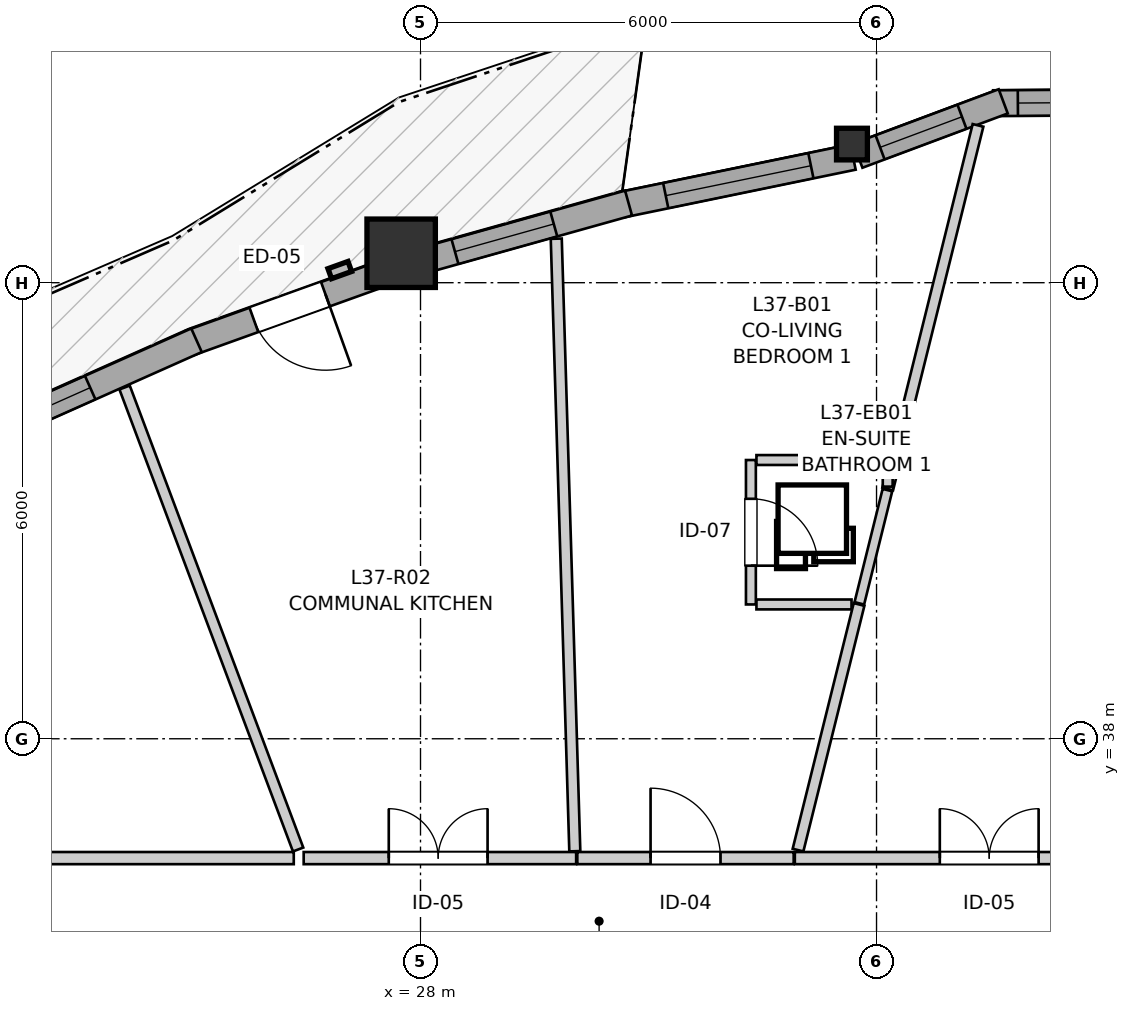
"""IFC4 building model, lengths in metres.
Left out: names, types, materials, properties, quantities, classifications, styles, units other than length and angle.
Written with IfcOpenShell. Run it as: python <this file> out.ifc"""

import sys

from ifc_helpers import new_model, si_unit, direction, frame, frame_2d, origin, origin_2d, place, context, subcontext, project, spatial, rectangle, i_section, extrude, source, transform, mapped, element, fill, save


model = new_model("IFC4")
c1 = context("Model", 3, precision=1e-05, world=origin(), true_north=direction((0.0, 1.0)))
c2 = subcontext(c1, "Body", "Model", "MODEL_VIEW")
j1 = project(units=[si_unit("LENGTHUNIT", "METRE"), si_unit("PLANEANGLEUNIT", "RADIAN")], contexts=[c1])
p1 = place(None, origin())
s1 = spatial("IfcSite", under=j1, at=p1, CompositionType="ELEMENT")
p2 = place(p1, origin())
s2 = spatial("IfcBuilding", under=s1, at=p2, CompositionType="ELEMENT")
p3 = place(p2, frame((0.0, 0.0, 124.8)))
s3 = spatial("IfcBuildingStorey", under=s2, at=p3, CompositionType="ELEMENT", Elevation=124.8)
m1 = source(origin(), c2, "Body", "SweptSolid", [
    extrude(i_section(OverallWidth=0.406, OverallDepth=0.416, WebThickness=0.027, FlangeThickness=0.044, FilletRadius=0.015, at=origin_2d()), origin(), (0.0, 0.0, 1.0), 2.9),
])
p4 = place(p3, frame((33.677, 45.824, 0.0), z_axis=(0.0, 0.0, 1.0), x_axis=(1.0, 0.0, 0.0)))
e1 = element("IfcColumn", 1, at=p4, inside=s3, PredefinedType="PILASTER", context=c2, shape_type="MappedRepresentation", body=[
    mapped(m1, transform((0.0, 0.0, 0.0), x_axis=(1.0, 0.0, 0.0), y_axis=(0.0, 1.0, 0.0), z_axis=(0.0, 0.0, 1.0), scale=1.0)),
])
m2 = source(origin(), c2, "Body", "SweptSolid", [
    extrude(rectangle(XDim=0.9, YDim=0.9, at=origin_2d()), origin(), (0.0, 0.0, 1.0), 2.9),
])
p5 = place(p3, frame((27.746, 44.387, 0.0), z_axis=(0.0, 0.0, 1.0), x_axis=(1.0, 0.0, 0.0)))
e2 = element("IfcColumn", 2, at=p5, inside=s3, PredefinedType="COLUMN", context=c2, shape_type="MappedRepresentation", body=[
    mapped(m2, transform((0.0, 0.0, 0.0), x_axis=(1.0, 0.0, 0.0), y_axis=(0.0, 1.0, 0.0), z_axis=(0.0, 0.0, 1.0), scale=1.0)),
])
p6 = place(p3, frame((37.634, 46.376, 0.0), z_axis=(0.0, 0.0, 1.0), x_axis=(-0.999976456891, -0.00686189939, 0.0)))
e3 = element("IfcWall", 3, at=p6, inside=s3, PredefinedType="SOLIDWALL", context=c2, shape_type="SweptSolid", body=[
    extrude(rectangle(XDim=2.099, YDim=0.34, at=frame_2d((1.05, 0.0))), origin(), (0.0, 0.0, 1.0), 2.43),
])
p7 = place(p6, frame((0.324, 0.0, 0.82)))
e4 = element("IfcOpeningElement", 4, at=p7, cuts=e3, PredefinedType="OPENING", context=c2, shape_type="SweptSolid", body=[
    extrude(rectangle(XDim=1.45, YDim=1.25, at=frame_2d((0.725, 0.625))), frame((0.0, 0.18, 0.0), z_axis=(0.0, -1.0, 0.0), x_axis=(1.0, 0.0, 0.0)), (0.0, 0.0, 1.0), 0.36),
])
p8 = place(p3, frame((35.667, 46.386, 0.0), z_axis=(0.0, 0.0, 1.0), x_axis=(-0.936761017964, -0.34996970615, 0.0)))
e5 = element("IfcWall", 5, at=p8, inside=s3, PredefinedType="SOLIDWALL", context=c2, shape_type="SweptSolid", body=[
    extrude(rectangle(XDim=2.041, YDim=0.34, at=frame_2d((1.021, 0.0))), origin(), (0.0, 0.0, 1.0), 2.43),
])
p9 = place(p8, frame((0.579, 0.0, 0.82)))
e6 = element("IfcOpeningElement", 6, at=p9, cuts=e5, PredefinedType="OPENING", context=c2, shape_type="SweptSolid", body=[
    extrude(rectangle(XDim=1.15, YDim=1.2, at=frame_2d((0.575, 0.6))), frame((0.0, 0.18, 0.0), z_axis=(0.0, -1.0, 0.0), x_axis=(1.0, 0.0, 0.0)), (0.0, 0.0, 1.0), 0.36),
])
p10 = place(p3, frame((33.691, 45.653, 0.0), z_axis=(0.0, 0.0, 1.0), x_axis=(-0.979414063846, -0.201861565287, 0.0)))
e7 = element("IfcWall", 7, at=p10, inside=s3, PredefinedType="SOLIDWALL", context=c2, shape_type="SweptSolid", body=[
    extrude(rectangle(XDim=3.104, YDim=0.34, at=frame_2d((1.552, 0.0))), origin(), (0.0, 0.0, 1.0), 2.43),
])
p11 = place(p10, frame((0.567, 0.0, 0.82)))
e8 = element("IfcOpeningElement", 8, at=p11, cuts=e7, PredefinedType="OPENING", context=c2, shape_type="SweptSolid", body=[
    extrude(rectangle(XDim=1.95, YDim=1.4, at=frame_2d((0.975, 0.7))), frame((0.0, 0.18, 0.0), z_axis=(0.0, -1.0, 0.0), x_axis=(1.0, 0.0, 0.0)), (0.0, 0.0, 1.0), 0.36),
])
p12 = place(p3, frame((30.737, 45.048, 0.0), z_axis=(0.0, 0.0, 1.0), x_axis=(-0.963026728711, -0.26940586443, 0.0)))
e9 = element("IfcWall", 9, at=p12, inside=s3, PredefinedType="SOLIDWALL", context=c2, shape_type="SweptSolid", body=[
    extrude(rectangle(XDim=2.829, YDim=0.34, at=frame_2d((1.415, 0.0))), origin(), (0.0, 0.0, 1.0), 2.43),
])
p13 = place(p12, frame((1.021, 0.0, 0.82)))
e10 = element("IfcOpeningElement", 10, at=p13, cuts=e9, PredefinedType="OPENING", context=c2, shape_type="SweptSolid", body=[
    extrude(rectangle(XDim=1.35, YDim=1.45, at=frame_2d((0.675, 0.725))), frame((0.0, 0.18, 0.0), z_axis=(0.0, -1.0, 0.0), x_axis=(1.0, 0.0, 0.0)), (0.0, 0.0, 1.0), 0.36),
])
p14 = place(p3, frame((27.586, 44.149, 0.0), z_axis=(0.0, 0.0, 1.0), x_axis=(-0.941112277287, -0.338094190338, 0.0)))
e11 = element("IfcWall", 11, at=p14, inside=s3, PredefinedType="SOLIDWALL", context=c2, shape_type="SweptSolid", body=[
    extrude(rectangle(XDim=2.779, YDim=0.34, at=frame_2d((1.39, 0.0))), origin(), (0.0, 0.0, 1.0), 2.43),
])
p15 = place(p14, frame((0.89, 0.0, 0.0)))
e12 = element("IfcOpeningElement", 12, at=p15, cuts=e11, PredefinedType="OPENING", context=c2, shape_type="SweptSolid", body=[
    extrude(rectangle(XDim=1.0, YDim=2.1, at=frame_2d((0.5, 1.05))), frame((0.0, 0.18, 0.0), z_axis=(0.0, -1.0, 0.0), x_axis=(1.0, 0.0, 0.0)), (0.0, 0.0, 1.0), 0.36),
])
p16 = place(p3, frame((25.053, 43.243, 0.0), z_axis=(0.0, 0.0, 1.0), x_axis=(-0.91339900063, -0.407065431655, 0.0)))
e13 = element("IfcWall", 13, at=p16, inside=s3, PredefinedType="SOLIDWALL", context=c2, shape_type="SweptSolid", body=[
    extrude(rectangle(XDim=2.956, YDim=0.34, at=frame_2d((1.478, 0.0))), origin(), (0.0, 0.0, 1.0), 2.43),
])
p17 = place(p16, frame((1.531, 0.0, 0.82)))
e14 = element("IfcOpeningElement", 14, at=p17, cuts=e13, PredefinedType="OPENING", context=c2, shape_type="SweptSolid", body=[
    extrude(rectangle(XDim=0.95, YDim=1.35, at=frame_2d((0.475, 0.675))), frame((0.0, 0.18, 0.0), z_axis=(0.0, -1.0, 0.0), x_axis=(1.0, 0.0, 0.0)), (0.0, 0.0, 1.0), 0.36),
])
p18 = place(p3, frame((32.925, 36.43, 0.0), z_axis=(0.0, 0.0, 1.0), x_axis=(1.0, 0.0, 0.0)))
e15 = element("IfcWall", 15, at=p18, inside=s3, PredefinedType="PARTITIONING", context=c2, shape_type="SweptSolid", body=[
    extrude(rectangle(XDim=5.118, YDim=0.16, at=frame_2d((2.559, 0.0))), origin(), (0.0, 0.0, 1.0), 2.538),
])
p19 = place(p18, frame((1.907, 0.0, 0.0)))
e16 = element("IfcOpeningElement", 16, at=p19, cuts=e15, PredefinedType="OPENING", context=c2, shape_type="SweptSolid", body=[
    extrude(rectangle(XDim=1.3, YDim=2.1, at=frame_2d((0.65, 1.05))), frame((0.0, 0.09, 0.0), z_axis=(0.0, -1.0, 0.0), x_axis=(1.0, 0.0, 0.0)), (0.0, 0.0, 1.0), 0.18),
])
p20 = place(p3, frame((26.463, 36.43, 0.0), z_axis=(0.0, 0.0, 1.0), x_axis=(1.0, 0.0, 0.0)))
e17 = element("IfcWall", 17, at=p20, inside=s3, PredefinedType="PARTITIONING", context=c2, shape_type="SweptSolid", body=[
    extrude(rectangle(XDim=3.585, YDim=0.16, at=frame_2d((1.792, 0.0))), origin(), (0.0, 0.0, 1.0), 2.9),
])
p21 = place(p20, frame((1.119, 0.0, 0.0)))
e18 = element("IfcOpeningElement", 18, at=p21, cuts=e17, PredefinedType="OPENING", context=c2, shape_type="SweptSolid", body=[
    extrude(rectangle(XDim=1.3, YDim=2.1, at=frame_2d((0.65, 1.05))), frame((0.0, 0.09, 0.0), z_axis=(0.0, -1.0, 0.0), x_axis=(1.0, 0.0, 0.0)), (0.0, 0.0, 1.0), 0.18),
])
p22 = place(p3, frame((30.063, 36.43, 0.0), z_axis=(0.0, 0.0, 1.0), x_axis=(1.0, 0.0, 0.0)))
e19 = element("IfcWall", 19, at=p22, inside=s3, PredefinedType="PARTITIONING", context=c2, shape_type="SweptSolid", body=[
    extrude(rectangle(XDim=2.847, YDim=0.16, at=frame_2d((1.423, 0.0))), origin(), (0.0, 0.0, 1.0), 2.9),
])
p23 = place(p22, frame((0.964, 0.0, 0.0)))
e20 = element("IfcOpeningElement", 20, at=p23, cuts=e19, PredefinedType="OPENING", context=c2, shape_type="SweptSolid", body=[
    extrude(rectangle(XDim=0.92, YDim=2.1, at=frame_2d((0.46, 1.05))), frame((0.0, 0.09, 0.0), z_axis=(0.0, -1.0, 0.0), x_axis=(1.0, 0.0, 0.0)), (0.0, 0.0, 1.0), 0.18),
])
p24 = place(p3, frame((32.347, 41.667, 0.0), z_axis=(0.0, 0.0, 1.0), x_axis=(0.0, -1.0, 0.0)))
e21 = element("IfcWall", 21, at=p24, inside=s3, PredefinedType="PARTITIONING", context=c2, shape_type="SweptSolid", body=[
    extrude(rectangle(XDim=1.9, YDim=0.13, at=frame_2d((0.95, 0.0))), origin(), (0.0, 0.0, 1.0), 2.9),
])
p25 = place(p24, frame((0.51, 0.0, 0.0)))
e22 = element("IfcOpeningElement", 22, at=p25, cuts=e21, PredefinedType="OPENING", context=c2, shape_type="SweptSolid", body=[
    extrude(rectangle(XDim=0.88, YDim=2.05, at=frame_2d((0.44, 1.025))), frame((0.0, 0.075, 0.0), z_axis=(0.0, -1.0, 0.0), x_axis=(1.0, 0.0, 0.0)), (0.0, 0.0, 1.0), 0.15),
])
p26 = place(p3, frame((29.786, 44.579, 0.0), z_axis=(0.0, 0.0, 1.0), x_axis=(0.030281792334, -0.99954140137, 0.0)))
e23 = element("IfcWall", 23, at=p26, inside=s3, PredefinedType="PARTITIONING", context=c2, shape_type="SweptSolid", body=[
    extrude(rectangle(XDim=8.062, YDim=0.145, at=frame_2d((4.031, 0.0))), origin(), (0.0, 0.0, 1.0), 2.9),
])
p27 = place(p3, frame((24.107, 42.621, 0.0), z_axis=(0.0, 0.0, 1.0), x_axis=(0.351605509999, -0.93614826034, 0.0)))
e24 = element("IfcWall", 24, at=p27, inside=s3, PredefinedType="PARTITIONING", context=c2, shape_type="SweptSolid", body=[
    extrude(rectangle(XDim=6.493, YDim=0.145, at=frame_2d((3.247, 0.0))), origin(), (0.0, 0.0, 1.0), 2.9),
])
p28 = place(p3, frame((34.147, 41.286, 0.0), z_axis=(0.0, 0.0, 1.0), x_axis=(0.241055314039, 0.970511378384, 0.0)))
e25 = element("IfcWall", 25, at=p28, inside=s3, PredefinedType="PARTITIONING", context=c2, shape_type="SweptSolid", body=[
    extrude(rectangle(XDim=4.929, YDim=0.145, at=frame_2d((2.465, 0.0))), origin(), (0.0, 0.0, 1.0), 2.9),
])
p29 = place(p3, frame((22.258, 36.43, 0.0), z_axis=(0.0, 0.0, 1.0), x_axis=(1.0, 0.0, 0.0)))
e26 = element("IfcWall", 26, at=p29, inside=s3, PredefinedType="PARTITIONING", context=c2, shape_type="SweptSolid", body=[
    extrude(rectangle(XDim=4.074, YDim=0.16, at=frame_2d((2.037, 0.0))), origin(), (0.0, 0.0, 1.0), 2.538),
])
p30 = place(p3, frame((32.967, 36.535, 0.0), z_axis=(0.0, 0.0, 1.0), x_axis=(0.241120890255, 0.970495088232, 0.0)))
e27 = element("IfcWall", 27, at=p30, inside=s3, PredefinedType="PARTITIONING", context=c2, shape_type="SweptSolid", body=[
    extrude(rectangle(XDim=3.33, YDim=0.145, at=frame_2d((1.665, 0.0))), origin(), (0.0, 0.0, 1.0), 2.9),
])
p31 = place(p3, frame((32.42, 41.667, 0.0), z_axis=(0.0, 0.0, 1.0), x_axis=(1.0, 0.0, 0.0)))
e28 = element("IfcWall", 28, at=p31, inside=s3, PredefinedType="PARTITIONING", context=c2, shape_type="SweptSolid", body=[
    extrude(rectangle(XDim=1.628, YDim=0.13, at=frame_2d((0.814, 0.0))), origin(), (0.0, 0.0, 1.0), 2.9),
])
p32 = place(p3, frame((33.774, 39.781, 0.0), z_axis=(0.0, 0.0, 1.0), x_axis=(0.240776504653, 0.970580586457, 0.0)))
e29 = element("IfcWall", 29, at=p32, inside=s3, PredefinedType="PARTITIONING", context=c2, shape_type="SweptSolid", body=[
    extrude(rectangle(XDim=1.535, YDim=0.13, at=frame_2d((0.768, 0.0))), origin(), (0.0, 0.0, 1.0), 2.9),
])
p33 = place(p3, frame((32.42, 39.767, 0.0), z_axis=(0.0, 0.0, 1.0), x_axis=(1.0, 0.0, 0.0)))
e30 = element("IfcWall", 30, at=p33, inside=s3, PredefinedType="PARTITIONING", context=c2, shape_type="SweptSolid", body=[
    extrude(rectangle(XDim=1.251, YDim=0.13, at=frame_2d((0.625, 0.0))), origin(), (0.0, 0.0, 1.0), 2.9),
])
p34 = place(p3, frame((34.147, 41.317, 0.0), z_axis=(0.0, 0.0, 1.0), x_axis=(0.0, 1.0, 0.0)))
e31 = element("IfcWall", 31, at=p34, inside=s3, PredefinedType="PARTITIONING", context=c2, shape_type="SweptSolid", body=[
    extrude(rectangle(XDim=0.35, YDim=0.13, at=frame_2d((0.175, 0.0))), origin(), (0.0, 0.0, 1.0), 2.9),
])
m3 = source(origin(), c2, "Body", "SweptSolid", [
    extrude(rectangle(XDim=1.45, YDim=1.25, at=frame_2d((0.725, 0.625))), frame((0.0, 0.03, 0.0), z_axis=(0.0, -1.0, 0.0), x_axis=(1.0, 0.0, 0.0)), (0.0, 0.0, 1.0), 0.06),
])
p35 = place(p7, origin())
e32 = element("IfcWindow", 32, at=p35, inside=s3, PartitioningType="SINGLE_PANEL", PredefinedType="WINDOW", context=c2, shape_type="MappedRepresentation", body=[
    mapped(m3, transform((0.0, 0.0, 0.0), x_axis=(1.0, 0.0, 0.0), y_axis=(0.0, 1.0, 0.0), z_axis=(0.0, 0.0, 1.0), scale=1.0)),
])
fill(e4, e32)
m4 = source(origin(), c2, "Body", "SweptSolid", [
    extrude(rectangle(XDim=1.15, YDim=1.2, at=frame_2d((0.575, 0.6))), frame((0.0, 0.03, 0.0), z_axis=(0.0, -1.0, 0.0), x_axis=(1.0, 0.0, 0.0)), (0.0, 0.0, 1.0), 0.06),
])
p36 = place(p9, origin())
e33 = element("IfcWindow", 33, at=p36, inside=s3, PartitioningType="SINGLE_PANEL", PredefinedType="WINDOW", context=c2, shape_type="MappedRepresentation", body=[
    mapped(m4, transform((0.0, 0.0, 0.0), x_axis=(1.0, 0.0, 0.0), y_axis=(0.0, 1.0, 0.0), z_axis=(0.0, 0.0, 1.0), scale=1.0)),
])
fill(e6, e33)
m5 = source(origin(), c2, "Body", "SweptSolid", [
    extrude(rectangle(XDim=1.95, YDim=1.4, at=frame_2d((0.975, 0.7))), frame((0.0, 0.03, 0.0), z_axis=(0.0, -1.0, 0.0), x_axis=(1.0, 0.0, 0.0)), (0.0, 0.0, 1.0), 0.06),
])
p37 = place(p11, origin())
e34 = element("IfcWindow", 34, at=p37, inside=s3, PartitioningType="SINGLE_PANEL", PredefinedType="WINDOW", context=c2, shape_type="MappedRepresentation", body=[
    mapped(m5, transform((0.0, 0.0, 0.0), x_axis=(1.0, 0.0, 0.0), y_axis=(0.0, 1.0, 0.0), z_axis=(0.0, 0.0, 1.0), scale=1.0)),
])
fill(e8, e34)
m6 = source(origin(), c2, "Body", "SweptSolid", [
    extrude(rectangle(XDim=1.35, YDim=1.45, at=frame_2d((0.675, 0.725))), frame((0.0, 0.03, 0.0), z_axis=(0.0, -1.0, 0.0), x_axis=(1.0, 0.0, 0.0)), (0.0, 0.0, 1.0), 0.06),
])
p38 = place(p13, origin())
e35 = element("IfcWindow", 35, at=p38, inside=s3, PartitioningType="SINGLE_PANEL", PredefinedType="WINDOW", context=c2, shape_type="MappedRepresentation", body=[
    mapped(m6, transform((0.0, 0.0, 0.0), x_axis=(1.0, 0.0, 0.0), y_axis=(0.0, 1.0, 0.0), z_axis=(0.0, 0.0, 1.0), scale=1.0)),
])
fill(e10, e35)
m7 = source(origin(), c2, "Body", "SweptSolid", [
    extrude(rectangle(XDim=0.95, YDim=1.35, at=frame_2d((0.475, 0.675))), frame((0.0, 0.03, 0.0), z_axis=(0.0, -1.0, 0.0), x_axis=(1.0, 0.0, 0.0)), (0.0, 0.0, 1.0), 0.06),
])
p39 = place(p17, origin())
e36 = element("IfcWindow", 36, at=p39, inside=s3, PartitioningType="SINGLE_PANEL", PredefinedType="WINDOW", context=c2, shape_type="MappedRepresentation", body=[
    mapped(m7, transform((0.0, 0.0, 0.0), x_axis=(1.0, 0.0, 0.0), y_axis=(0.0, 1.0, 0.0), z_axis=(0.0, 0.0, 1.0), scale=1.0)),
])
fill(e14, e36)
m8 = source(origin(), c2, "Body", "SweptSolid", [
    extrude(rectangle(XDim=1.0, YDim=2.1, at=frame_2d((0.5, 1.05))), frame((0.0, 0.025, 0.0), z_axis=(0.0, -1.0, 0.0), x_axis=(1.0, 0.0, 0.0)), (0.0, 0.0, 1.0), 0.05),
])
p40 = place(p15, origin())
e37 = element("IfcDoor", 37, at=p40, inside=s3, OperationType="SINGLE_SWING_LEFT", PredefinedType="DOOR", context=c2, shape_type="MappedRepresentation", body=[
    mapped(m8, transform((0.0, 0.0, 0.0), x_axis=(1.0, 0.0, 0.0), y_axis=(0.0, 1.0, 0.0), z_axis=(0.0, 0.0, 1.0), scale=1.0)),
])
fill(e12, e37)
m9 = source(origin(), c2, "Body", "SweptSolid", [
    extrude(rectangle(XDim=1.3, YDim=2.1, at=frame_2d((0.65, 1.05))), frame((0.0, 0.025, 0.0), z_axis=(0.0, -1.0, 0.0), x_axis=(1.0, 0.0, 0.0)), (0.0, 0.0, 1.0), 0.05),
])
p41 = place(p19, origin())
e38 = element("IfcDoor", 38, at=p41, inside=s3, OperationType="DOUBLE_DOOR_SINGLE_SWING", PredefinedType="DOOR", context=c2, shape_type="MappedRepresentation", body=[
    mapped(m9, transform((0.0, 0.0, 0.0), x_axis=(1.0, 0.0, 0.0), y_axis=(0.0, 1.0, 0.0), z_axis=(0.0, 0.0, 1.0), scale=1.0)),
])
fill(e16, e38)
p42 = place(p21, origin())
e39 = element("IfcDoor", 39, at=p42, inside=s3, OperationType="DOUBLE_DOOR_SINGLE_SWING", PredefinedType="DOOR", context=c2, shape_type="MappedRepresentation", body=[
    mapped(m9, transform((0.0, 0.0, 0.0), x_axis=(1.0, 0.0, 0.0), y_axis=(0.0, 1.0, 0.0), z_axis=(0.0, 0.0, 1.0), scale=1.0)),
])
fill(e18, e39)
m10 = source(origin(), c2, "Body", "SweptSolid", [
    extrude(rectangle(XDim=0.92, YDim=2.1, at=frame_2d((0.46, 1.05))), frame((0.0, 0.025, 0.0), z_axis=(0.0, -1.0, 0.0), x_axis=(1.0, 0.0, 0.0)), (0.0, 0.0, 1.0), 0.05),
])
p43 = place(p23, origin())
e40 = element("IfcDoor", 40, at=p43, inside=s3, OperationType="SINGLE_SWING_LEFT", PredefinedType="DOOR", context=c2, shape_type="MappedRepresentation", body=[
    mapped(m10, transform((0.0, 0.0, 0.0), x_axis=(1.0, 0.0, 0.0), y_axis=(0.0, 1.0, 0.0), z_axis=(0.0, 0.0, 1.0), scale=1.0)),
])
fill(e20, e40)
m11 = source(origin(), c2, "Body", "SweptSolid", [
    extrude(rectangle(XDim=0.88, YDim=2.05, at=frame_2d((0.44, 1.025))), frame((0.0, 0.025, 0.0), z_axis=(0.0, -1.0, 0.0), x_axis=(1.0, 0.0, 0.0)), (0.0, 0.0, 1.0), 0.05),
])
p44 = place(p25, origin())
e41 = element("IfcDoor", 41, at=p44, inside=s3, OperationType="SINGLE_SWING_RIGHT", PredefinedType="DOOR", context=c2, shape_type="MappedRepresentation", body=[
    mapped(m11, transform((0.0, 0.0, 0.0), x_axis=(1.0, 0.0, 0.0), y_axis=(0.0, 1.0, 0.0), z_axis=(0.0, 0.0, 1.0), scale=1.0)),
])
fill(e22, e41)
save(model, sys.argv[1])
